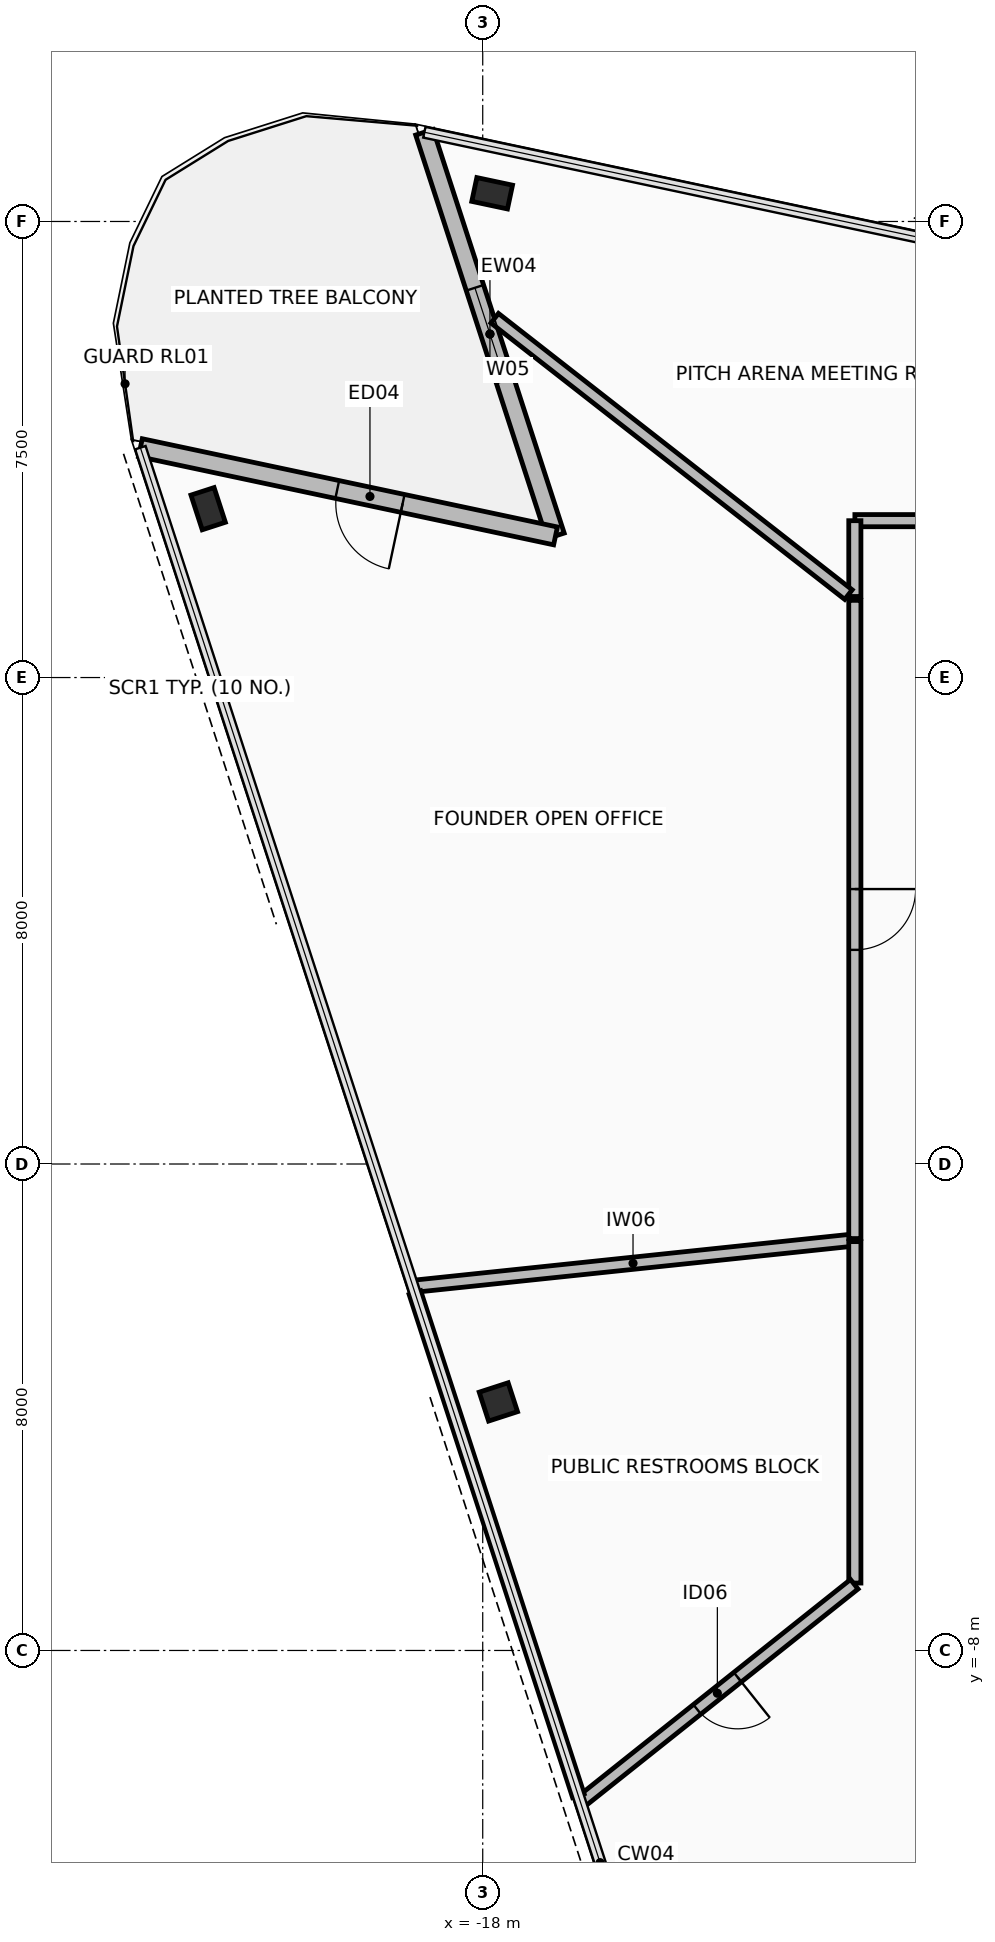
"""IFC4 building model, lengths in metres.
Left out: names, types, materials, properties, quantities, classifications, styles, units other than length and angle.
Written with IfcOpenShell. Run it as: python <this file> out.ifc"""

import sys

from ifc_helpers import new_model, si_unit, direction, frame, frame_2d, origin, origin_2d, place, context, subcontext, project, spatial, rectangle, hollow_rectangle, extrude, element, fill, save


model = new_model("IFC4")
c1 = context("Model", 3, precision=1e-05, world=origin(), true_north=direction((0.0, 1.0)))
c2 = subcontext(c1, "Body", "Model", "MODEL_VIEW")
j1 = project(units=[si_unit("LENGTHUNIT", "METRE"), si_unit("PLANEANGLEUNIT", "RADIAN")], contexts=[c1])
p1 = place(None, origin())
s1 = spatial("IfcSite", under=j1, at=p1, CompositionType="ELEMENT")
p2 = place(p1, origin())
s2 = spatial("IfcBuilding", under=s1, at=p2, CompositionType="ELEMENT")
p3 = place(p2, frame((0.0, 0.0, 204.05)))
s3 = spatial("IfcBuildingStorey", under=s2, at=p3, CompositionType="ELEMENT", Elevation=204.05)
p4 = place(p3, frame((-22.515, 10.777, 0.0), z_axis=(0.0, 0.0, 1.0), x_axis=(-0.309016994375, 0.951056516295, 0.0)))
e1 = element("IfcColumn", 1, at=p4, inside=s3, PredefinedType="COLUMN", context=c2, shape_type="SweptSolid", body=[
    extrude(hollow_rectangle(XDim=0.4, YDim=0.6, WallThickness=0.03, at=origin_2d()), origin(), (0.0, 0.0, 1.0), 3.6),
])
p5 = place(p3, frame((-17.743, -3.913, 0.0), z_axis=(0.0, 0.0, 1.0), x_axis=(-0.309016994375, 0.951056516295, 0.0)))
e2 = element("IfcColumn", 2, at=p5, inside=s3, PredefinedType="COLUMN", context=c2, shape_type="SweptSolid", body=[
    extrude(hollow_rectangle(XDim=0.5, YDim=0.5, WallThickness=0.032, at=origin_2d()), origin(), (0.0, 0.0, 1.0), 3.6),
])
p6 = place(p3, frame((-17.845, 15.964, 0.0), z_axis=(0.0, 0.0, 1.0), x_axis=(-0.978147600734, 0.207911690818, 0.0)))
e3 = element("IfcColumn", 3, at=p6, inside=s3, PredefinedType="COLUMN", context=c2, shape_type="SweptSolid", body=[
    extrude(hollow_rectangle(XDim=0.4, YDim=0.6, WallThickness=0.03, at=origin_2d()), origin(), (0.0, 0.0, 1.0), 3.6),
])
p7 = place(p3, frame((-18.96, 16.968, 0.0), z_axis=(0.0, 0.0, 1.0), x_axis=(0.309030708092, -0.951052060329, 0.0)))
e4 = element("IfcWall", 4, at=p7, inside=s3, PredefinedType="STANDARD", context=c2, shape_type="SweptSolid", body=[
    extrude(rectangle(XDim=6.98, YDim=0.3, at=frame_2d((3.49, 0.0))), origin(), (0.0, 0.0, 1.0), 2.715),
])
p8 = place(p7, frame((2.69, 0.0, 0.335)))
e5 = element("IfcOpeningElement", 5, at=p8, cuts=e4, PredefinedType="OPENING", context=c2, shape_type="SweptSolid", body=[
    extrude(rectangle(XDim=1.6, YDim=2.2, at=frame_2d((0.8, 1.1))), frame((0.0, 0.16, 0.0), z_axis=(0.0, -1.0, 0.0), x_axis=(1.0, 0.0, 0.0)), (0.0, 0.0, 1.0), 0.32),
])
p9 = place(p3, frame((-16.803, 10.329, 0.0), z_axis=(0.0, 0.0, 1.0), x_axis=(-0.9781486268, 0.207906863497, 0.0)))
e6 = element("IfcWall", 6, at=p9, inside=s3, PredefinedType="STANDARD", context=c2, shape_type="SweptSolid", body=[
    extrude(rectangle(XDim=6.98, YDim=0.3, at=frame_2d((3.49, 0.0))), origin(), (0.0, 0.0, 1.0), 2.715),
])
p10 = place(p9, frame((2.57, 0.0, 0.0)))
e7 = element("IfcOpeningElement", 7, at=p10, cuts=e6, PredefinedType="OPENING", context=c2, shape_type="SweptSolid", body=[
    extrude(rectangle(XDim=1.1, YDim=2.2, at=frame_2d((0.55, 1.1))), frame((0.0, 0.16, 0.0), z_axis=(0.0, -1.0, 0.0), x_axis=(1.0, 0.0, 0.0)), (0.0, 0.0, 1.0), 0.32),
])
p11 = place(p3, frame((-19.148, -2.013, 0.0), z_axis=(0.0, 0.0, 1.0), x_axis=(0.994519041439, 0.104555613029, 0.0)))
e8 = element("IfcWall", 8, at=p11, inside=s3, PredefinedType="PARTITIONING", context=c2, shape_type="SweptSolid", body=[
    extrude(rectangle(XDim=7.281, YDim=0.2, at=frame_2d((3.64, 0.0))), origin(), (0.0, 0.0, 1.0), 2.715),
])
p12 = place(p3, frame((-11.88, -1.276, 0.0), z_axis=(0.0, 0.0, 1.0), x_axis=(0.0, -1.0, 0.0)))
e9 = element("IfcWall", 9, at=p12, inside=s3, PredefinedType="PARTITIONING", context=c2, shape_type="SweptSolid", body=[
    extrude(rectangle(XDim=5.615, YDim=0.2, at=frame_2d((2.808, 0.0))), origin(), (0.0, 0.0, 1.0), 2.865),
])
p13 = place(p3, frame((-11.889, -6.911, 0.0), z_axis=(0.0, 0.0, 1.0), x_axis=(-0.782381192735, -0.622799862922, 0.0)))
e10 = element("IfcWall", 10, at=p13, inside=s3, PredefinedType="PARTITIONING", context=c2, shape_type="SweptSolid", body=[
    extrude(rectangle(XDim=5.755, YDim=0.2, at=frame_2d((2.878, 0.0))), origin(), (0.0, 0.0, 1.0), 2.715),
])
p14 = place(p13, frame((2.453, 0.0, 0.0)))
e11 = element("IfcOpeningElement", 11, at=p14, cuts=e10, PredefinedType="OPENING", context=c2, shape_type="SweptSolid", body=[
    extrude(rectangle(XDim=0.85, YDim=2.1, at=frame_2d((0.425, 1.05))), frame((0.0, 0.11, 0.0), z_axis=(0.0, -1.0, 0.0), x_axis=(1.0, 0.0, 0.0)), (0.0, 0.0, 1.0), 0.22),
])
p15 = place(p3, frame((-16.427, -10.389, 0.0), z_axis=(0.0, 0.0, 1.0), x_axis=(-0.309020714809, 0.951055307445, 0.0)))
e12 = element("IfcWall", 12, at=p15, inside=s3, PredefinedType="PARTITIONING", context=c2, shape_type="SweptSolid", body=[
    extrude(rectangle(XDim=8.7, YDim=0.2, at=frame_2d((4.35, 0.0))), origin(), (0.0, 0.0, 1.0), 3.42),
])
p16 = place(p3, frame((-14.266, -17.001, 0.0), z_axis=(0.0, 0.0, 1.0), x_axis=(0.642791188124, 0.766041440439, 0.0)))
e13 = element("IfcWall", 13, at=p16, inside=s3, PredefinedType="PARTITIONING", context=c2, shape_type="SweptSolid", body=[
    extrude(rectangle(XDim=8.371, YDim=0.2, at=frame_2d((4.186, 0.0))), origin(), (0.0, 0.0, 1.0), 2.715),
])
p17 = place(p3, frame((-2.356, 10.58, 0.0), z_axis=(0.0, 0.0, 1.0), x_axis=(-1.0, 0.0, 0.0)))
e14 = element("IfcWall", 14, at=p17, inside=s3, PredefinedType="PARTITIONING", context=c2, shape_type="SweptSolid", body=[
    extrude(rectangle(XDim=9.523, YDim=0.2, at=frame_2d((4.762, 0.0))), origin(), (0.0, 0.0, 1.0), 2.865),
])
p18 = place(p17, frame((4.162, 0.0, 0.0)))
e15 = element("IfcOpeningElement", 15, at=p18, cuts=e14, PredefinedType="OPENING", context=c2, shape_type="SweptSolid", body=[
    extrude(rectangle(XDim=1.2, YDim=2.15, at=frame_2d((0.6, 1.075))), frame((0.0, 0.11, 0.0), z_axis=(0.0, -1.0, 0.0), x_axis=(1.0, 0.0, 0.0)), (0.0, 0.0, 1.0), 0.22),
])
p19 = place(p3, frame((-11.88, 10.579, 0.0), z_axis=(0.0, 0.0, 1.0), x_axis=(0.0, -1.0, 0.0)))
e16 = element("IfcWall", 16, at=p19, inside=s3, PredefinedType="PARTITIONING", context=c2, shape_type="SweptSolid", body=[
    extrude(rectangle(XDim=1.246, YDim=0.2, at=frame_2d((0.623, 0.0))), origin(), (0.0, 0.0, 1.0), 2.765),
])
p20 = place(p3, frame((-11.985, 9.364, 0.0), z_axis=(0.0, 0.0, 1.0), x_axis=(-0.788011338845, 0.615660726254, 0.0)))
e17 = element("IfcWall", 17, at=p20, inside=s3, PredefinedType="PARTITIONING", context=c2, shape_type="SweptSolid", body=[
    extrude(rectangle(XDim=7.383, YDim=0.2, at=frame_2d((3.691, 0.0))), origin(), (0.0, 0.0, 1.0), 2.765),
])
p21 = place(p3, frame((-11.88, 9.27, 0.0), z_axis=(0.0, 0.0, 1.0), x_axis=(0.0, -1.0, 0.0)))
e18 = element("IfcWall", 18, at=p21, inside=s3, PredefinedType="PARTITIONING", context=c2, shape_type="SweptSolid", body=[
    extrude(rectangle(XDim=10.496, YDim=0.2, at=frame_2d((5.248, 0.0))), origin(), (0.0, 0.0, 1.0), 2.765),
])
p22 = place(p21, frame((4.748, 0.0, 0.0)))
e19 = element("IfcOpeningElement", 19, at=p22, cuts=e18, PredefinedType="OPENING", context=c2, shape_type="SweptSolid", body=[
    extrude(rectangle(XDim=1.0, YDim=2.15, at=frame_2d((0.5, 1.075))), frame((0.0, 0.11, 0.0), z_axis=(0.0, -1.0, 0.0), x_axis=(1.0, 0.0, 0.0)), (0.0, 0.0, 1.0), 0.22),
])
p23 = place(p10, origin())
e20 = element("IfcDoor", 20, at=p23, inside=s3, OperationType="SINGLE_SWING_LEFT", PredefinedType="DOOR", context=c2, shape_type="SweptSolid", body=[
    extrude(rectangle(XDim=1.1, YDim=2.2, at=frame_2d((0.55, 1.1))), frame((0.0, 0.025, 0.0), z_axis=(0.0, -1.0, 0.0), x_axis=(1.0, 0.0, 0.0)), (0.0, 0.0, 1.0), 0.05),
])
fill(e7, e20)
p24 = place(p8, origin())
e21 = element("IfcWindow", 21, at=p24, inside=s3, PartitioningType="SINGLE_PANEL", PredefinedType="WINDOW", context=c2, shape_type="SweptSolid", body=[
    extrude(rectangle(XDim=1.6, YDim=2.2, at=frame_2d((0.8, 1.1))), frame((0.0, 0.03, 0.0), z_axis=(0.0, -1.0, 0.0), x_axis=(1.0, 0.0, 0.0)), (0.0, 0.0, 1.0), 0.06),
])
fill(e5, e21)
p25 = place(p14, origin())
e22 = element("IfcDoor", 22, at=p25, inside=s3, OperationType="SINGLE_SWING_RIGHT", PredefinedType="DOOR", context=c2, shape_type="SweptSolid", body=[
    extrude(rectangle(XDim=0.85, YDim=2.1, at=frame_2d((0.425, 1.05))), frame((0.0, 0.025, 0.0), z_axis=(0.0, -1.0, 0.0), x_axis=(1.0, 0.0, 0.0)), (0.0, 0.0, 1.0), 0.05),
])
fill(e11, e22)
p26 = place(p22, origin())
e23 = element("IfcDoor", 23, at=p26, inside=s3, OperationType="SINGLE_SWING_RIGHT", PredefinedType="DOOR", context=c2, shape_type="SweptSolid", body=[
    extrude(rectangle(XDim=1.0, YDim=2.15, at=frame_2d((0.5, 1.075))), frame((0.0, 0.025, 0.0), z_axis=(0.0, -1.0, 0.0), x_axis=(1.0, 0.0, 0.0)), (0.0, 0.0, 1.0), 0.05),
])
fill(e19, e23)
save(model, sys.argv[1])
